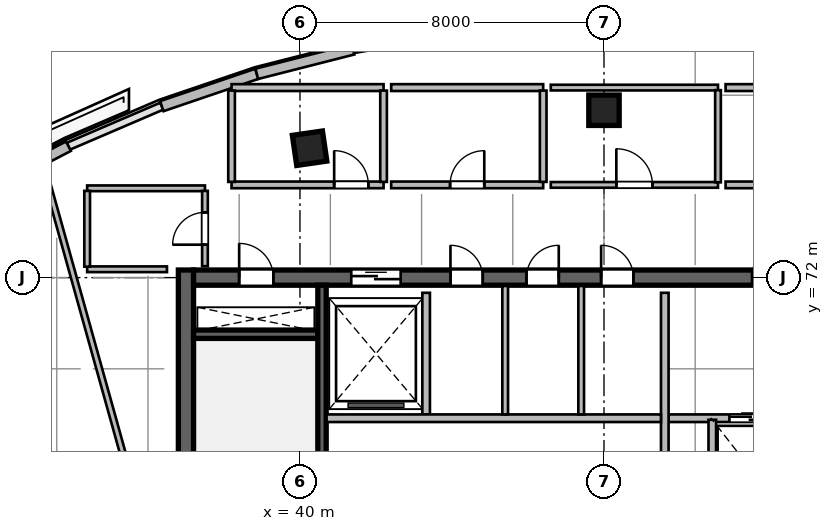
"""IFC4 building model, lengths in metres.
Left out: names, types, materials, properties, quantities, classifications, styles, units other than length and angle.
Written with IfcOpenShell. Run it as: python <this file> out.ifc"""

import sys

from ifc_helpers import new_model, si_unit, direction, frame, frame_2d, origin, origin_2d, place, context, subcontext, project, spatial, rectangle, extrude, source, transform, mapped, element, fill, save


model = new_model("IFC4")
c1 = context("Model", 3, precision=1e-05, world=origin(), true_north=direction((0.0, 1.0)))
c2 = subcontext(c1, "Body", "Model", "MODEL_VIEW")
j1 = project(units=[si_unit("LENGTHUNIT", "METRE"), si_unit("PLANEANGLEUNIT", "RADIAN")], contexts=[c1])
p1 = place(None, origin())
s1 = spatial("IfcSite", under=j1, at=p1, CompositionType="ELEMENT")
p2 = place(p1, origin())
s2 = spatial("IfcBuilding", under=s1, at=p2, CompositionType="ELEMENT")
p3 = place(p2, frame((0.0, 0.0, 275.7)))
s3 = spatial("IfcBuildingStorey", under=s2, at=p3, CompositionType="ELEMENT", Elevation=275.7)
m1 = source(origin(), c2, "Body", "SweptSolid", [
    extrude(rectangle(XDim=12.0, YDim=0.4, at=frame_2d((6.0, 0.0))), origin(), (0.0, 0.0, 1.0), 3.9),
])
p4 = place(p3, frame((37.0, 60.2, 0.0), z_axis=(0.0, 0.0, 1.0), x_axis=(0.0, 1.0, 0.0)))
e1 = element("IfcWall", 1, at=p4, inside=s3, PredefinedType="SHEAR", context=c2, shape_type="MappedRepresentation", body=[
    mapped(m1, transform((0.0, 0.0, 0.0), scale=1.0)),
])
m2 = source(origin(), c2, "Body", "SweptSolid", [
    extrude(rectangle(XDim=21.6, YDim=0.4, at=frame_2d((10.8, 0.0))), origin(), (0.0, 0.0, 1.0), 3.9),
])
p5 = place(p3, frame((37.2, 72.0, 0.0), z_axis=(0.0, 0.0, 1.0), x_axis=(1.0, 0.0, 0.0)))
e2 = element("IfcWall", 2, at=p5, inside=s3, PredefinedType="SHEAR", context=c2, shape_type="MappedRepresentation", body=[
    mapped(m2, transform((0.0, 0.0, 0.0), scale=1.0)),
])
p6 = place(p5, frame((1.2, 0.0, 0.0)))
e3 = element("IfcOpeningElement", 3, at=p6, cuts=e2, PredefinedType="OPENING", context=c2, shape_type="SweptSolid", body=[
    extrude(rectangle(XDim=0.9, YDim=2.1, at=frame_2d((0.45, 1.05))), frame((0.0, 0.21, 0.0), z_axis=(0.0, -1.0, 0.0), x_axis=(1.0, 0.0, 0.0)), (0.0, 0.0, 1.0), 0.42),
])
p7 = place(p5, frame((14.7, 0.0, 0.0)))
e4 = element("IfcOpeningElement", 4, at=p7, cuts=e2, PredefinedType="OPENING", context=c2, shape_type="SweptSolid", body=[
    extrude(rectangle(XDim=1.2, YDim=2.15, at=frame_2d((0.6, 1.075))), frame((0.0, 0.21, 0.0), z_axis=(0.0, -1.0, 0.0), x_axis=(1.0, 0.0, 0.0)), (0.0, 0.0, 1.0), 0.42),
])
p8 = place(p5, frame((4.15, 0.0, 0.0)))
e5 = element("IfcOpeningElement", 5, at=p8, cuts=e2, PredefinedType="OPENING", context=c2, shape_type="SweptSolid", body=[
    extrude(rectangle(XDim=1.3, YDim=2.15, at=frame_2d((0.65, 1.075))), frame((0.0, 0.21, 0.0), z_axis=(0.0, -1.0, 0.0), x_axis=(1.0, 0.0, 0.0)), (0.0, 0.0, 1.0), 0.42),
])
p9 = place(p5, frame((6.76, 0.0, 0.0)))
e6 = element("IfcOpeningElement", 6, at=p9, cuts=e2, PredefinedType="OPENING", context=c2, shape_type="SweptSolid", body=[
    extrude(rectangle(XDim=0.85, YDim=2.1, at=frame_2d((0.425, 1.05))), frame((0.0, 0.21, 0.0), z_axis=(0.0, -1.0, 0.0), x_axis=(1.0, 0.0, 0.0)), (0.0, 0.0, 1.0), 0.42),
])
p10 = place(p5, frame((8.76, 0.0, 0.0)))
e7 = element("IfcOpeningElement", 7, at=p10, cuts=e2, PredefinedType="OPENING", context=c2, shape_type="SweptSolid", body=[
    extrude(rectangle(XDim=0.85, YDim=2.1, at=frame_2d((0.425, 1.05))), frame((0.0, 0.21, 0.0), z_axis=(0.0, -1.0, 0.0), x_axis=(1.0, 0.0, 0.0)), (0.0, 0.0, 1.0), 0.42),
])
p11 = place(p5, frame((10.725, 0.0, 0.0)))
e8 = element("IfcOpeningElement", 8, at=p11, cuts=e2, PredefinedType="OPENING", context=c2, shape_type="SweptSolid", body=[
    extrude(rectangle(XDim=0.85, YDim=2.1, at=frame_2d((0.425, 1.05))), frame((0.0, 0.21, 0.0), z_axis=(0.0, -1.0, 0.0), x_axis=(1.0, 0.0, 0.0)), (0.0, 0.0, 1.0), 0.42),
])
m3 = source(origin(), c2, "Body", "SweptSolid", [
    extrude(rectangle(XDim=3.27, YDim=0.22, at=frame_2d((1.635, 0.0))), origin(), (0.0, 0.0, 1.0), 3.9),
])
p12 = place(p3, frame((37.2, 70.51, 0.0), z_axis=(0.0, 0.0, 1.0), x_axis=(1.0, 0.0, 0.0)))
e9 = element("IfcWall", 9, at=p12, inside=s3, PredefinedType="SHEAR", context=c2, shape_type="MappedRepresentation", body=[
    mapped(m3, transform((0.0, 0.0, 0.0), scale=1.0)),
])
m4 = source(origin(), c2, "Body", "SweptSolid", [
    extrude(rectangle(XDim=11.2, YDim=0.22, at=frame_2d((5.6, 0.0))), origin(), (0.0, 0.0, 1.0), 3.9),
])
p13 = place(p3, frame((40.58, 60.6, 0.0), z_axis=(0.0, 0.0, 1.0), x_axis=(0.0, 1.0, 0.0)))
e10 = element("IfcWall", 10, at=p13, inside=s3, PredefinedType="SHEAR", context=c2, shape_type="MappedRepresentation", body=[
    mapped(m4, transform((0.0, 0.0, 0.0), scale=1.0)),
])
m5 = source(origin(), c2, "Body", "SweptSolid", [
    extrude(rectangle(XDim=0.8, YDim=0.8, at=origin_2d()), origin(), (0.0, 0.0, 1.0), 3.9),
])
for number, where, z_axis, x_axis in (
    (11, (40.253, 75.404, 0.0), (0.0, 0.0, 1.0), (-0.143, 0.99, 0.0)),
    (12, (48.0, 76.404, 0.0), (0.0, 0.0, 1.0), (0.0, 1.0, 0.0)),
):
    element("IfcColumn", number, at=place(p3, frame(where, z_axis=z_axis, x_axis=x_axis)), inside=s3, PredefinedType="COLUMN", context=c2, shape_type="MappedRepresentation", body=[
        mapped(m5, transform((0.0, 0.0, 0.0), scale=1.0)),
    ])
m6 = source(origin(), c2, "Body", "SweptSolid", [
    extrude(rectangle(XDim=2.711, YDim=0.28, at=frame_2d((1.356, 0.0))), origin(), (0.0, 0.0, 1.0), 3.64),
])
p14 = place(p3, frame((31.502, 74.205, 0.0), z_axis=(0.0, 0.0, 1.0), x_axis=(0.886828760751, 0.462098202881, 0.0)))
e13 = element("IfcWall", 13, at=p14, inside=s3, PredefinedType="SOLIDWALL", context=c2, shape_type="MappedRepresentation", body=[
    mapped(m6, transform((0.0, 0.0, 0.0), scale=1.0)),
])
m7 = source(origin(), c2, "Body", "SweptSolid", [
    extrude(rectangle(XDim=2.64, YDim=0.28, at=frame_2d((1.32, 0.0))), origin(), (0.0, 0.0, 1.0), 3.64),
])
p15 = place(p3, frame((36.364, 76.511, 0.0), z_axis=(0.0, 0.0, 1.0), x_axis=(0.946685911962, 0.322158011064, 0.0)))
e14 = element("IfcWall", 14, at=p15, inside=s3, PredefinedType="SOLIDWALL", context=c2, shape_type="MappedRepresentation", body=[
    mapped(m7, transform((0.0, 0.0, 0.0), scale=1.0)),
])
m8 = source(origin(), c2, "Body", "SweptSolid", [
    extrude(rectangle(XDim=2.614, YDim=0.28, at=frame_2d((1.307, 0.0))), origin(), (0.0, 0.0, 1.0), 3.64),
])
p16 = place(p3, frame((38.863, 77.362, 0.0), z_axis=(0.0, 0.0, 1.0), x_axis=(0.969106509315, 0.246642602978, 0.0)))
e15 = element("IfcWall", 15, at=p16, inside=s3, PredefinedType="SOLIDWALL", context=c2, shape_type="MappedRepresentation", body=[
    mapped(m8, transform((0.0, 0.0, 0.0), scale=1.0)),
])
m9 = source(origin(), c2, "Body", "SweptSolid", [
    extrude(rectangle(XDim=5.62, YDim=0.2, at=frame_2d((2.81, 0.0))), origin(), (0.0, 0.0, 1.0), 3.64),
])
p17 = place(p3, frame((49.7, 68.3, 0.0), z_axis=(0.0, 0.0, 1.0), x_axis=(1.0, 0.0, 0.0)))
e16 = element("IfcWall", 16, at=p17, inside=s3, PredefinedType="SOLIDWALL", context=c2, shape_type="MappedRepresentation", body=[
    mapped(m9, transform((0.0, 0.0, 0.0), scale=1.0)),
])
p18 = place(p17, frame((1.6, 0.0, 0.0)))
e17 = element("IfcOpeningElement", 17, at=p18, cuts=e16, PredefinedType="OPENING", context=c2, shape_type="SweptSolid", body=[
    extrude(rectangle(XDim=1.1, YDim=2.15, at=frame_2d((0.55, 1.075))), frame((0.0, 0.11, 0.0), z_axis=(0.0, -1.0, 0.0), x_axis=(1.0, 0.0, 0.0)), (0.0, 0.0, 1.0), 0.22),
])
p19 = place(p17, frame((3.7, 0.0, 0.0)))
e18 = element("IfcOpeningElement", 18, at=p19, cuts=e16, PredefinedType="OPENING", context=c2, shape_type="SweptSolid", body=[
    extrude(rectangle(XDim=1.1, YDim=2.15, at=frame_2d((0.55, 1.075))), frame((0.0, 0.11, 0.0), z_axis=(0.0, -1.0, 0.0), x_axis=(1.0, 0.0, 0.0)), (0.0, 0.0, 1.0), 0.22),
])
m10 = source(origin(), c2, "Body", "SweptSolid", [
    extrude(rectangle(XDim=5.8, YDim=0.2, at=frame_2d((2.9, 0.0))), origin(), (0.0, 0.0, 1.0), 3.64),
])
p20 = place(p3, frame((49.6, 65.8, 0.0), z_axis=(0.0, 0.0, 1.0), x_axis=(0.0, 1.0, 0.0)))
e19 = element("IfcWall", 19, at=p20, inside=s3, PredefinedType="SOLIDWALL", context=c2, shape_type="MappedRepresentation", body=[
    mapped(m10, transform((0.0, 0.0, 0.0), scale=1.0)),
])
m11 = source(origin(), c2, "Body", "SweptSolid", [
    extrude(rectangle(XDim=2.58, YDim=0.2, at=frame_2d((1.29, 0.0))), origin(), (0.0, 0.0, 1.0), 3.64),
])
p21 = place(p3, frame((50.85, 65.68, 0.0), z_axis=(0.0, 0.0, 1.0), x_axis=(0.0, 1.0, 0.0)))
e20 = element("IfcWall", 20, at=p21, inside=s3, PredefinedType="SOLIDWALL", context=c2, shape_type="MappedRepresentation", body=[
    mapped(m11, transform((0.0, 0.0, 0.0), scale=1.0)),
])
m12 = source(origin(), c2, "Body", "SweptSolid", [
    extrude(rectangle(XDim=3.2, YDim=0.2, at=frame_2d((1.6, 0.0))), origin(), (0.0, 0.0, 1.0), 3.64),
])
p22 = place(p3, frame((43.32, 68.4, 0.0), z_axis=(0.0, 0.0, 1.0), x_axis=(0.0, 1.0, 0.0)))
e21 = element("IfcWall", 21, at=p22, inside=s3, PredefinedType="SOLIDWALL", context=c2, shape_type="MappedRepresentation", body=[
    mapped(m12, transform((0.0, 0.0, 0.0), scale=1.0)),
])
m13 = source(origin(), c2, "Body", "SweptSolid", [
    extrude(rectangle(XDim=8.8, YDim=0.2, at=frame_2d((4.4, 0.0))), origin(), (0.0, 0.0, 1.0), 3.64),
])
p23 = place(p3, frame((40.7, 68.3, 0.0), z_axis=(0.0, 0.0, 1.0), x_axis=(1.0, 0.0, 0.0)))
e22 = element("IfcWall", 22, at=p23, inside=s3, PredefinedType="SOLIDWALL", context=c2, shape_type="MappedRepresentation", body=[
    mapped(m13, transform((0.0, 0.0, 0.0), scale=1.0)),
])
m14 = source(origin(), c2, "Body", "SweptSolid", [
    extrude(rectangle(XDim=3.38, YDim=0.15, at=frame_2d((1.69, 0.0))), origin(), (0.0, 0.0, 1.0), 3.64),
])
for number, where, z_axis, x_axis in (
    (23, (45.4, 68.4, 0.0), (0.0, 0.0, 1.0), (0.0, 1.0, 0.0)),
    (24, (47.4, 68.4, 0.0), (0.0, 0.0, 1.0), (0.0, 1.0, 0.0)),
):
    element("IfcWall", number, at=place(p3, frame(where, z_axis=z_axis, x_axis=x_axis)), inside=s3, PredefinedType="PARTITIONING", context=c2, shape_type="MappedRepresentation", body=[
        mapped(m14, transform((0.0, 0.0, 0.0), scale=1.0)),
    ])
m15 = source(origin(), c2, "Body", "SweptSolid", [
    extrude(rectangle(XDim=2.1, YDim=0.15, at=frame_2d((1.05, 0.0))), origin(), (0.0, 0.0, 1.0), 3.64),
])
p24 = place(p3, frame((34.4, 72.22, 0.0), z_axis=(0.0, 0.0, 1.0), x_axis=(1.0, 0.0, 0.0)))
e25 = element("IfcWall", 25, at=p24, inside=s3, PredefinedType="PARTITIONING", context=c2, shape_type="MappedRepresentation", body=[
    mapped(m15, transform((0.0, 0.0, 0.0), scale=1.0)),
])
m16 = source(origin(), c2, "Body", "SweptSolid", [
    extrude(rectangle(XDim=3.1, YDim=0.15, at=frame_2d((1.55, 0.0))), origin(), (0.0, 0.0, 1.0), 3.071),
])
p25 = place(p3, frame((34.4, 74.35, 0.0), z_axis=(0.0, 0.0, 1.0), x_axis=(1.0, 0.0, 0.0)))
e26 = element("IfcWall", 26, at=p25, inside=s3, PredefinedType="PARTITIONING", context=c2, shape_type="MappedRepresentation", body=[
    mapped(m16, transform((0.0, 0.0, 0.0), scale=1.0)),
])
m17 = source(origin(), c2, "Body", "SweptSolid", [
    extrude(rectangle(XDim=1.995, YDim=0.15, at=frame_2d((0.998, 0.0))), origin(), (0.0, 0.0, 1.0), 3.64),
])
p26 = place(p3, frame((34.4, 72.288, 0.0), z_axis=(0.0, 0.0, 1.0), x_axis=(0.0, 1.0, 0.0)))
e27 = element("IfcWall", 27, at=p26, inside=s3, PredefinedType="PARTITIONING", context=c2, shape_type="MappedRepresentation", body=[
    mapped(m17, transform((0.0, 0.0, 0.0), scale=1.0)),
])
m18 = source(origin(), c2, "Body", "SweptSolid", [
    extrude(rectangle(XDim=1.982, YDim=0.15, at=frame_2d((0.991, 0.0))), origin(), (0.0, 0.0, 1.0), 3.64),
])
p27 = place(p3, frame((37.5, 72.3, 0.0), z_axis=(0.0, 0.0, 1.0), x_axis=(0.0, 1.0, 0.0)))
e28 = element("IfcWall", 28, at=p27, inside=s3, PredefinedType="PARTITIONING", context=c2, shape_type="MappedRepresentation", body=[
    mapped(m18, transform((0.0, 0.0, 0.0), scale=1.0)),
])
p28 = place(p27, frame((0.566, 0.0, 0.0)))
e29 = element("IfcOpeningElement", 29, at=p28, cuts=e28, PredefinedType="OPENING", context=c2, shape_type="SweptSolid", body=[
    extrude(rectangle(XDim=0.85, YDim=2.1, at=frame_2d((0.425, 1.05))), frame((0.0, 0.085, 0.0), z_axis=(0.0, -1.0, 0.0), x_axis=(1.0, 0.0, 0.0)), (0.0, 0.0, 1.0), 0.17),
])
m19 = source(origin(), c2, "Body", "SweptSolid", [
    extrude(rectangle(XDim=4.0, YDim=0.175, at=frame_2d((2.0, 0.0))), origin(), (0.0, 0.0, 1.0), 3.64),
])
p29 = place(p3, frame((38.2, 74.44, 0.0), z_axis=(0.0, 0.0, 1.0), x_axis=(1.0, 0.0, 0.0)))
e30 = element("IfcWall", 30, at=p29, inside=s3, PredefinedType="PARTITIONING", context=c2, shape_type="MappedRepresentation", body=[
    mapped(m19, transform((0.0, 0.0, 0.0), scale=1.0)),
])
p30 = place(p29, frame((2.7, 0.0, 0.0)))
e31 = element("IfcOpeningElement", 31, at=p30, cuts=e30, PredefinedType="OPENING", context=c2, shape_type="SweptSolid", body=[
    extrude(rectangle(XDim=0.9, YDim=2.08, at=frame_2d((0.45, 1.04))), frame((0.0, 0.098, 0.0), z_axis=(0.0, -1.0, 0.0), x_axis=(1.0, 0.0, 0.0)), (0.0, 0.0, 1.0), 0.195),
])
m20 = source(origin(), c2, "Body", "SweptSolid", [
    extrude(rectangle(XDim=4.0, YDim=0.18, at=frame_2d((2.0, 0.0))), origin(), (0.0, 0.0, 1.0), 3.64),
])
p31 = place(p3, frame((38.2, 77.0, 0.0), z_axis=(0.0, 0.0, 1.0), x_axis=(1.0, 0.0, 0.0)))
e32 = element("IfcWall", 32, at=p31, inside=s3, PredefinedType="PLUMBINGWALL", context=c2, shape_type="MappedRepresentation", body=[
    mapped(m20, transform((0.0, 0.0, 0.0), scale=1.0)),
])
m21 = source(origin(), c2, "Body", "SweptSolid", [
    extrude(rectangle(XDim=2.403, YDim=0.175, at=frame_2d((1.201, 0.0))), origin(), (0.0, 0.0, 1.0), 3.64),
])
for number, where, z_axis, x_axis in (
    (33, (38.2, 74.519, 0.0), (0.0, 0.0, 1.0), (0.0, 1.0, 0.0)),
    (34, (42.2, 74.519, 0.0), (0.0, 0.0, 1.0), (0.0, 1.0, 0.0)),
):
    element("IfcWall", number, at=place(p3, frame(where, z_axis=z_axis, x_axis=x_axis)), inside=s3, PredefinedType="PARTITIONING", context=c2, shape_type="MappedRepresentation", body=[
        mapped(m21, transform((0.0, 0.0, 0.0), scale=1.0)),
    ])
p32 = place(p3, frame((42.4, 74.44, 0.0), z_axis=(0.0, 0.0, 1.0), x_axis=(1.0, 0.0, 0.0)))
e35 = element("IfcWall", 35, at=p32, inside=s3, PredefinedType="PARTITIONING", context=c2, shape_type="MappedRepresentation", body=[
    mapped(m19, transform((0.0, 0.0, 0.0), scale=1.0)),
])
p33 = place(p32, frame((1.55, 0.0, 0.0)))
e36 = element("IfcOpeningElement", 36, at=p33, cuts=e35, PredefinedType="OPENING", context=c2, shape_type="SweptSolid", body=[
    extrude(rectangle(XDim=0.9, YDim=2.08, at=frame_2d((0.45, 1.04))), frame((0.0, 0.098, 0.0), z_axis=(0.0, -1.0, 0.0), x_axis=(1.0, 0.0, 0.0)), (0.0, 0.0, 1.0), 0.195),
])
p34 = place(p3, frame((42.4, 77.0, 0.0), z_axis=(0.0, 0.0, 1.0), x_axis=(1.0, 0.0, 0.0)))
e37 = element("IfcWall", 37, at=p34, inside=s3, PredefinedType="PLUMBINGWALL", context=c2, shape_type="MappedRepresentation", body=[
    mapped(m20, transform((0.0, 0.0, 0.0), scale=1.0)),
])
p35 = place(p3, frame((46.4, 74.519, 0.0), z_axis=(0.0, 0.0, 1.0), x_axis=(0.0, 1.0, 0.0)))
e38 = element("IfcWall", 38, at=p35, inside=s3, PredefinedType="PARTITIONING", context=c2, shape_type="MappedRepresentation", body=[
    mapped(m21, transform((0.0, 0.0, 0.0), scale=1.0)),
])
m22 = source(origin(), c2, "Body", "SweptSolid", [
    extrude(rectangle(XDim=4.4, YDim=0.15, at=frame_2d((2.2, 0.0))), origin(), (0.0, 0.0, 1.0), 3.64),
])
p36 = place(p3, frame((46.6, 74.44, 0.0), z_axis=(0.0, 0.0, 1.0), x_axis=(1.0, 0.0, 0.0)))
e39 = element("IfcWall", 39, at=p36, inside=s3, PredefinedType="PARTITIONING", context=c2, shape_type="MappedRepresentation", body=[
    mapped(m22, transform((0.0, 0.0, 0.0), scale=1.0)),
])
p37 = place(p36, frame((1.725, 0.0, 0.0)))
e40 = element("IfcOpeningElement", 40, at=p37, cuts=e39, PredefinedType="OPENING", context=c2, shape_type="SweptSolid", body=[
    extrude(rectangle(XDim=0.95, YDim=2.1, at=frame_2d((0.475, 1.05))), frame((0.0, 0.085, 0.0), z_axis=(0.0, -1.0, 0.0), x_axis=(1.0, 0.0, 0.0)), (0.0, 0.0, 1.0), 0.17),
])
p38 = place(p3, frame((46.6, 77.0, 0.0), z_axis=(0.0, 0.0, 1.0), x_axis=(1.0, 0.0, 0.0)))
e41 = element("IfcWall", 41, at=p38, inside=s3, PredefinedType="PARTITIONING", context=c2, shape_type="MappedRepresentation", body=[
    mapped(m22, transform((0.0, 0.0, 0.0), scale=1.0)),
])
m23 = source(origin(), c2, "Body", "SweptSolid", [
    extrude(rectangle(XDim=2.425, YDim=0.15, at=frame_2d((1.212, 0.0))), origin(), (0.0, 0.0, 1.0), 3.64),
])
p39 = place(p3, frame((51.0, 74.508, 0.0), z_axis=(0.0, 0.0, 1.0), x_axis=(0.0, 1.0, 0.0)))
e42 = element("IfcWall", 42, at=p39, inside=s3, PredefinedType="PARTITIONING", context=c2, shape_type="MappedRepresentation", body=[
    mapped(m23, transform((0.0, 0.0, 0.0), scale=1.0)),
])
m24 = source(origin(), c2, "Body", "SweptSolid", [
    extrude(rectangle(XDim=4.2, YDim=0.175, at=frame_2d((2.1, 0.0))), origin(), (0.0, 0.0, 1.0), 3.64),
])
p40 = place(p3, frame((51.2, 74.44, 0.0), z_axis=(0.0, 0.0, 1.0), x_axis=(1.0, 0.0, 0.0)))
e43 = element("IfcWall", 43, at=p40, inside=s3, PredefinedType="PARTITIONING", context=c2, shape_type="MappedRepresentation", body=[
    mapped(m24, transform((0.0, 0.0, 0.0), scale=1.0)),
])
p41 = place(p40, frame((1.625, 0.0, 0.0)))
e44 = element("IfcOpeningElement", 44, at=p41, cuts=e43, PredefinedType="OPENING", context=c2, shape_type="SweptSolid", body=[
    extrude(rectangle(XDim=0.95, YDim=2.12, at=frame_2d((0.475, 1.06))), frame((0.0, 0.098, 0.0), z_axis=(0.0, -1.0, 0.0), x_axis=(1.0, 0.0, 0.0)), (0.0, 0.0, 1.0), 0.195),
])
m25 = source(origin(), c2, "Body", "SweptSolid", [
    extrude(rectangle(XDim=4.2, YDim=0.18, at=frame_2d((2.1, 0.0))), origin(), (0.0, 0.0, 1.0), 3.64),
])
p42 = place(p3, frame((51.2, 77.0, 0.0), z_axis=(0.0, 0.0, 1.0), x_axis=(1.0, 0.0, 0.0)))
e45 = element("IfcWall", 45, at=p42, inside=s3, PredefinedType="PLUMBINGWALL", context=c2, shape_type="MappedRepresentation", body=[
    mapped(m25, transform((0.0, 0.0, 0.0), scale=1.0)),
])
m26 = source(origin(), c2, "Body", "SweptSolid", [
    extrude(rectangle(XDim=17.556, YDim=0.15, at=frame_2d((8.778, 0.0))), origin(), (0.0, 0.0, 1.0), 3.64),
])
p43 = place(p3, frame((33.8, 54.958, 0.0), z_axis=(0.0, 0.0, 1.0), x_axis=(-0.395687598313, 0.918385172213, 0.0)))
e46 = element("IfcWall", 46, at=p43, inside=s3, PredefinedType="PARTITIONING", context=c2, shape_type="MappedRepresentation", body=[
    mapped(m26, transform((0.0, 0.0, 0.0), scale=1.0)),
])
m27 = source(origin(), c2, "Body", "SweptSolid", [
    extrude(rectangle(XDim=12.311, YDim=0.15, at=frame_2d((6.155, 0.0))), origin(), (0.0, 0.0, 1.0), 3.64),
])
p44 = place(p3, frame((36.5, 63.216, 0.0), z_axis=(0.0, 0.0, 1.0), x_axis=(-0.268759602651, 0.963207286093, 0.0)))
e47 = element("IfcWall", 47, at=p44, inside=s3, PredefinedType="PARTITIONING", context=c2, shape_type="MappedRepresentation", body=[
    mapped(m27, transform((0.0, 0.0, 0.0), scale=1.0)),
])
m28 = source(origin(), c2, "Body", "SweptSolid", [
    extrude(rectangle(XDim=0.9, YDim=2.1, at=frame_2d((0.45, 1.05))), frame((0.0, 0.025, 0.0), z_axis=(0.0, -1.0, 0.0), x_axis=(1.0, 0.0, 0.0)), (0.0, 0.0, 1.0), 0.05),
])
p45 = place(p6, origin())
e48 = element("IfcDoor", 48, at=p45, inside=s3, OperationType="SINGLE_SWING_LEFT", PredefinedType="DOOR", context=c2, shape_type="MappedRepresentation", body=[
    mapped(m28, transform((0.0, 0.0, 0.0), scale=1.0)),
])
fill(e3, e48)
m29 = source(origin(), c2, "Body", "SweptSolid", [
    extrude(rectangle(XDim=1.2, YDim=2.15, at=frame_2d((0.6, 1.075))), frame((0.0, 0.025, 0.0), z_axis=(0.0, -1.0, 0.0), x_axis=(1.0, 0.0, 0.0)), (0.0, 0.0, 1.0), 0.05),
])
p46 = place(p7, origin())
e49 = element("IfcDoor", 49, at=p46, inside=s3, OperationType="SINGLE_SWING_RIGHT", PredefinedType="DOOR", context=c2, shape_type="MappedRepresentation", body=[
    mapped(m29, transform((0.0, 0.0, 0.0), scale=1.0)),
])
fill(e4, e49)
m30 = source(origin(), c2, "Body", "SweptSolid", [
    extrude(rectangle(XDim=1.1, YDim=2.15, at=frame_2d((0.55, 1.075))), frame((0.0, 0.025, 0.0), z_axis=(0.0, -1.0, 0.0), x_axis=(1.0, 0.0, 0.0)), (0.0, 0.0, 1.0), 0.05),
])
p47 = place(p18, origin())
e50 = element("IfcDoor", 50, at=p47, inside=s3, OperationType="DOUBLE_DOOR_SLIDING", PredefinedType="DOOR", context=c2, shape_type="MappedRepresentation", body=[
    mapped(m30, transform((0.0, 0.0, 0.0), scale=1.0)),
])
fill(e17, e50)
m31 = source(origin(), c2, "Body", "SweptSolid", [
    extrude(rectangle(XDim=1.3, YDim=2.15, at=frame_2d((0.65, 1.075))), frame((0.0, 0.025, 0.0), z_axis=(0.0, -1.0, 0.0), x_axis=(1.0, 0.0, 0.0)), (0.0, 0.0, 1.0), 0.05),
])
p48 = place(p8, origin())
e51 = element("IfcDoor", 51, at=p48, inside=s3, OperationType="DOUBLE_DOOR_SLIDING", PredefinedType="DOOR", context=c2, shape_type="MappedRepresentation", body=[
    mapped(m31, transform((0.0, 0.0, 0.0), scale=1.0)),
])
fill(e5, e51)
m32 = source(origin(), c2, "Body", "SweptSolid", [
    extrude(rectangle(XDim=0.85, YDim=2.1, at=frame_2d((0.425, 1.05))), frame((0.0, 0.025, 0.0), z_axis=(0.0, -1.0, 0.0), x_axis=(1.0, 0.0, 0.0)), (0.0, 0.0, 1.0), 0.05),
])
p49 = place(p9, origin())
e52 = element("IfcDoor", 52, at=p49, inside=s3, OperationType="SINGLE_SWING_LEFT", PredefinedType="DOOR", context=c2, shape_type="MappedRepresentation", body=[
    mapped(m32, transform((0.0, 0.0, 0.0), scale=1.0)),
])
fill(e6, e52)
p50 = place(p10, origin())
e53 = element("IfcDoor", 53, at=p50, inside=s3, OperationType="SINGLE_SWING_RIGHT", PredefinedType="DOOR", context=c2, shape_type="MappedRepresentation", body=[
    mapped(m32, transform((0.0, 0.0, 0.0), scale=1.0)),
])
fill(e7, e53)
p51 = place(p11, origin())
e54 = element("IfcDoor", 54, at=p51, inside=s3, OperationType="SINGLE_SWING_LEFT", PredefinedType="DOOR", context=c2, shape_type="MappedRepresentation", body=[
    mapped(m32, transform((0.0, 0.0, 0.0), scale=1.0)),
])
fill(e8, e54)
p52 = place(p28, origin())
e55 = element("IfcDoor", 55, at=p52, inside=s3, OperationType="SINGLE_SWING_LEFT", PredefinedType="DOOR", context=c2, shape_type="MappedRepresentation", body=[
    mapped(m32, transform((0.0, 0.0, 0.0), scale=1.0)),
])
fill(e29, e55)
m33 = source(origin(), c2, "Body", "SweptSolid", [
    extrude(rectangle(XDim=0.9, YDim=2.08, at=frame_2d((0.45, 1.04))), frame((0.0, 0.025, 0.0), z_axis=(0.0, -1.0, 0.0), x_axis=(1.0, 0.0, 0.0)), (0.0, 0.0, 1.0), 0.05),
])
p53 = place(p30, origin())
e56 = element("IfcDoor", 56, at=p53, inside=s3, OperationType="SINGLE_SWING_LEFT", PredefinedType="DOOR", context=c2, shape_type="MappedRepresentation", body=[
    mapped(m33, transform((0.0, 0.0, 0.0), scale=1.0)),
])
fill(e31, e56)
p54 = place(p33, origin())
e57 = element("IfcDoor", 57, at=p54, inside=s3, OperationType="SINGLE_SWING_RIGHT", PredefinedType="DOOR", context=c2, shape_type="MappedRepresentation", body=[
    mapped(m33, transform((0.0, 0.0, 0.0), scale=1.0)),
])
fill(e36, e57)
m34 = source(origin(), c2, "Body", "SweptSolid", [
    extrude(rectangle(XDim=0.95, YDim=2.1, at=frame_2d((0.475, 1.05))), frame((0.0, 0.025, 0.0), z_axis=(0.0, -1.0, 0.0), x_axis=(1.0, 0.0, 0.0)), (0.0, 0.0, 1.0), 0.05),
])
p55 = place(p37, origin())
e58 = element("IfcDoor", 58, at=p55, inside=s3, OperationType="SINGLE_SWING_LEFT", PredefinedType="DOOR", context=c2, shape_type="MappedRepresentation", body=[
    mapped(m34, transform((0.0, 0.0, 0.0), scale=1.0)),
])
fill(e40, e58)
save(model, sys.argv[1])
